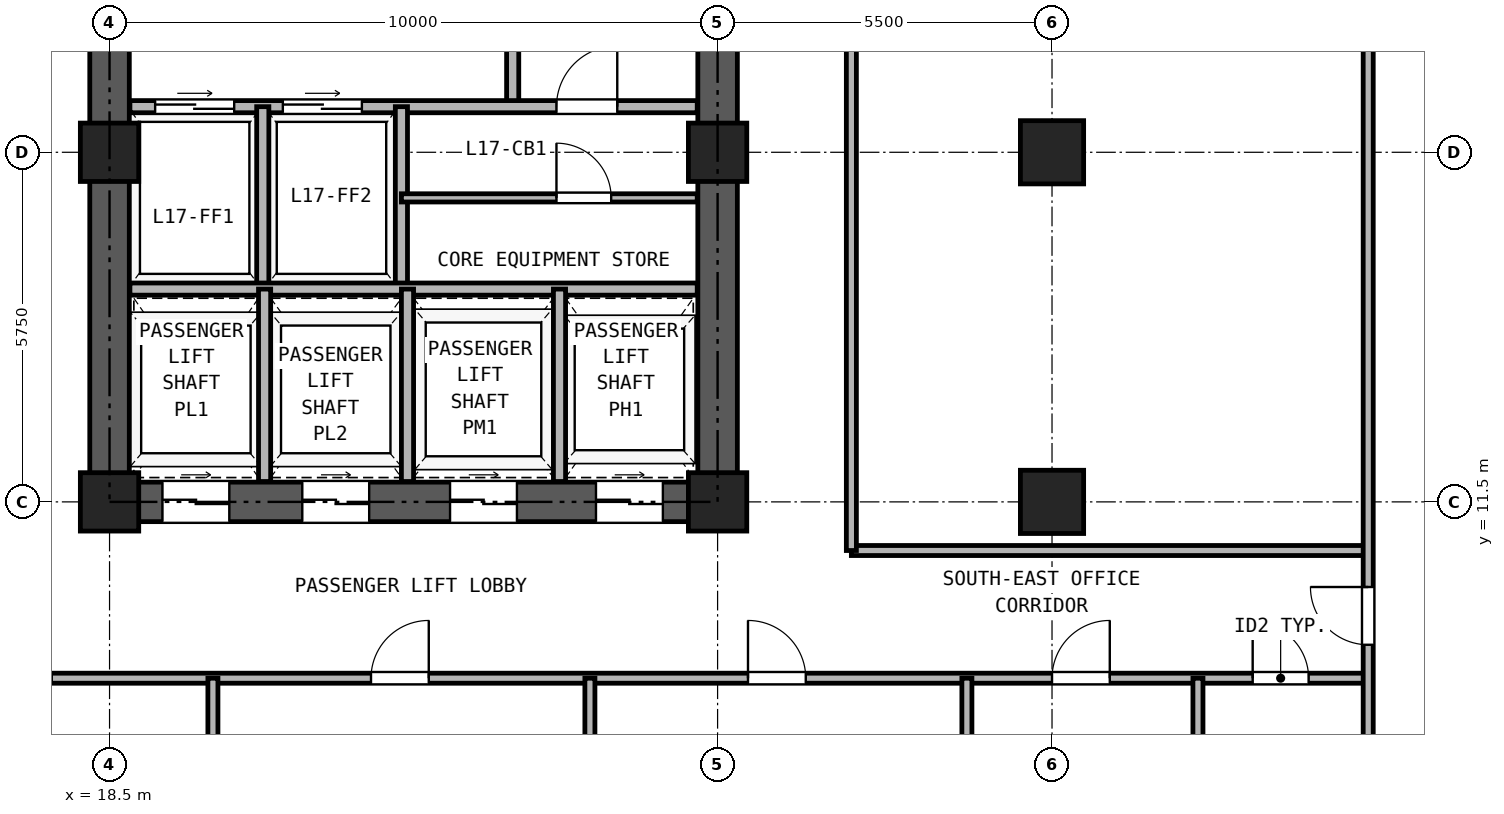
"""IFC4 building model, lengths in metres.
Left out: names, types, materials, properties, quantities, classifications, styles, units other than length and angle.
Written with IfcOpenShell. Run it as: python <this file> out.ifc"""

import sys

from ifc_helpers import new_model, si_unit, direction, frame, frame_2d, origin, origin_2d, place, context, subcontext, project, spatial, rectangle, hollow_rectangle, extrude, source, transform, mapped, element, fill, save


model = new_model("IFC4")
c1 = context("Model", 3, precision=1e-05, world=origin(), true_north=direction((0.0, 1.0)))
c2 = subcontext(c1, "Body", "Model", "MODEL_VIEW")
j1 = project(units=[si_unit("LENGTHUNIT", "METRE"), si_unit("PLANEANGLEUNIT", "RADIAN")], contexts=[c1])
p1 = place(None, origin())
s1 = spatial("IfcSite", under=j1, at=p1, CompositionType="ELEMENT")
p2 = place(p1, origin())
s2 = spatial("IfcBuilding", under=s1, at=p2, CompositionType="ELEMENT")
p3 = place(p2, frame((0.0, 0.0, 65.7)))
s3 = spatial("IfcBuildingStorey", under=s2, at=p3, CompositionType="ELEMENT", Elevation=65.7)
m1 = source(origin(), c2, "Body", "SweptSolid", [
    extrude(hollow_rectangle(XDim=0.96, YDim=0.96, WallThickness=0.06, at=origin_2d()), origin(), (0.0, 0.0, 1.0), 3.32),
])
for number, where, z_axis, x_axis in (
    (1, (18.5, 11.5, 0.0), (0.0, 0.0, 1.0), (1.0, 0.0, 0.0)),
    (2, (18.5, 17.25, 0.0), (0.0, 0.0, 1.0), (1.0, 0.0, 0.0)),
    (3, (28.5, 11.5, 0.0), (0.0, 0.0, 1.0), (1.0, 0.0, 0.0)),
    (4, (28.5, 17.25, 0.0), (0.0, 0.0, 1.0), (1.0, 0.0, 0.0)),
):
    element("IfcColumn", number, at=place(p3, frame(where, z_axis=z_axis, x_axis=x_axis)), inside=s3, PredefinedType="COLUMN", context=c2, shape_type="MappedRepresentation", body=[
        mapped(m1, transform((0.0, 0.0, 0.0), x_axis=(1.0, 0.0, 0.0), y_axis=(0.0, 1.0, 0.0), z_axis=(0.0, 0.0, 1.0), scale=1.0)),
    ])
m2 = source(origin(), c2, "Body", "SweptSolid", [
    extrude(hollow_rectangle(XDim=1.04, YDim=1.04, WallThickness=0.065, at=origin_2d()), origin(), (0.0, 0.0, 1.0), 3.32),
])
for number, where, z_axis, x_axis in (
    (5, (34.0, 11.5, 0.0), (0.0, 0.0, 1.0), (1.0, 0.0, 0.0)),
    (6, (34.0, 17.25, 0.0), (0.0, 0.0, 1.0), (1.0, 0.0, 0.0)),
):
    element("IfcColumn", number, at=place(p3, frame(where, z_axis=z_axis, x_axis=x_axis)), inside=s3, PredefinedType="COLUMN", context=c2, shape_type="MappedRepresentation", body=[
        mapped(m2, transform((0.0, 0.0, 0.0), x_axis=(1.0, 0.0, 0.0), y_axis=(0.0, 1.0, 0.0), z_axis=(0.0, 0.0, 1.0), scale=1.0)),
    ])
p4 = place(p3, frame((18.175, 11.5, 0.0), z_axis=(0.0, 0.0, 1.0), x_axis=(1.0, 0.0, 0.0)))
e7 = element("IfcWall", 7, at=p4, inside=s3, PredefinedType="SHEAR", context=c2, shape_type="SweptSolid", body=[
    extrude(rectangle(XDim=10.65, YDim=0.65, at=frame_2d((5.325, 0.0))), origin(), (0.0, 0.0, 1.0), 3.32),
])
p5 = place(p4, frame((1.195, 0.0, 0.0)))
e8 = element("IfcOpeningElement", 8, at=p5, cuts=e7, PredefinedType="OPENING", context=c2, shape_type="SweptSolid", body=[
    extrude(rectangle(XDim=1.1, YDim=2.25, at=frame_2d((0.55, 1.125))), frame((0.0, 0.335, 0.0), z_axis=(0.0, -1.0, 0.0), x_axis=(1.0, 0.0, 0.0)), (0.0, 0.0, 1.0), 0.67),
])
p6 = place(p4, frame((3.495, 0.0, 0.0)))
e9 = element("IfcOpeningElement", 9, at=p6, cuts=e7, PredefinedType="OPENING", context=c2, shape_type="SweptSolid", body=[
    extrude(rectangle(XDim=1.1, YDim=2.25, at=frame_2d((0.55, 1.125))), frame((0.0, 0.335, 0.0), z_axis=(0.0, -1.0, 0.0), x_axis=(1.0, 0.0, 0.0)), (0.0, 0.0, 1.0), 0.67),
])
p7 = place(p4, frame((5.925, 0.0, 0.0)))
e10 = element("IfcOpeningElement", 10, at=p7, cuts=e7, PredefinedType="OPENING", context=c2, shape_type="SweptSolid", body=[
    extrude(rectangle(XDim=1.1, YDim=2.25, at=frame_2d((0.55, 1.125))), frame((0.0, 0.335, 0.0), z_axis=(0.0, -1.0, 0.0), x_axis=(1.0, 0.0, 0.0)), (0.0, 0.0, 1.0), 0.67),
])
p8 = place(p4, frame((8.325, 0.0, 0.0)))
e11 = element("IfcOpeningElement", 11, at=p8, cuts=e7, PredefinedType="OPENING", context=c2, shape_type="SweptSolid", body=[
    extrude(rectangle(XDim=1.1, YDim=2.25, at=frame_2d((0.55, 1.125))), frame((0.0, 0.335, 0.0), z_axis=(0.0, -1.0, 0.0), x_axis=(1.0, 0.0, 0.0)), (0.0, 0.0, 1.0), 0.67),
])
p9 = place(p3, frame((18.5, 11.825, 0.0), z_axis=(0.0, 0.0, 1.0), x_axis=(0.0, 1.0, 0.0)))
e12 = element("IfcWall", 12, at=p9, inside=s3, PredefinedType="SHEAR", context=c2, shape_type="SweptSolid", body=[
    extrude(rectangle(XDim=16.6, YDim=0.65, at=frame_2d((8.3, 0.0))), origin(), (0.0, 0.0, 1.0), 3.32),
])
p10 = place(p9, frame((7.325, 0.0, 0.0)))
e13 = element("IfcOpeningElement", 13, at=p10, cuts=e12, PredefinedType="OPENING", context=c2, shape_type="SweptSolid", body=[
    extrude(rectangle(XDim=1.15, YDim=2.2, at=frame_2d((0.575, 1.1))), frame((0.0, 0.335, 0.0), z_axis=(0.0, -1.0, 0.0), x_axis=(1.0, 0.0, 0.0)), (0.0, 0.0, 1.0), 0.67),
])
p11 = place(p3, frame((28.5, 11.825, 0.0), z_axis=(0.0, 0.0, 1.0), x_axis=(0.0, 1.0, 0.0)))
e14 = element("IfcWall", 14, at=p11, inside=s3, PredefinedType="SHEAR", context=c2, shape_type="SweptSolid", body=[
    extrude(rectangle(XDim=16.6, YDim=0.65, at=frame_2d((8.3, 0.0))), origin(), (0.0, 0.0, 1.0), 3.32),
])
p12 = place(p11, frame((7.325, 0.0, 0.0)))
e15 = element("IfcOpeningElement", 15, at=p12, cuts=e14, PredefinedType="OPENING", context=c2, shape_type="SweptSolid", body=[
    extrude(rectangle(XDim=1.15, YDim=2.2, at=frame_2d((0.575, 1.1))), frame((0.0, 0.335, 0.0), z_axis=(0.0, -1.0, 0.0), x_axis=(1.0, 0.0, 0.0)), (0.0, 0.0, 1.0), 0.67),
])
p13 = place(p3, frame((25.13, 18.0, 0.0), z_axis=(0.0, 0.0, 1.0), x_axis=(0.0, 1.0, 0.0)))
e16 = element("IfcWall", 16, at=p13, inside=s3, PredefinedType="PARTITIONING", context=c2, shape_type="SweptSolid", body=[
    extrude(rectangle(XDim=3.39, YDim=0.2, at=frame_2d((1.695, 0.0))), origin(), (0.0, 0.0, 1.0), 3.32),
])
p14 = place(p13, frame((1.1, 0.0, 0.0)))
e17 = element("IfcOpeningElement", 17, at=p14, cuts=e16, PredefinedType="OPENING", context=c2, shape_type="SweptSolid", body=[
    extrude(rectangle(XDim=1.15, YDim=2.2, at=frame_2d((0.575, 1.1))), frame((0.0, 0.11, 0.0), z_axis=(0.0, -1.0, 0.0), x_axis=(1.0, 0.0, 0.0)), (0.0, 0.0, 1.0), 0.22),
])
p15 = place(p3, frame((18.835, 18.0, 0.0), z_axis=(0.0, 0.0, 1.0), x_axis=(1.0, 0.0, 0.0)))
e18 = element("IfcWall", 18, at=p15, inside=s3, PredefinedType="PARTITIONING", context=c2, shape_type="SweptSolid", body=[
    extrude(rectangle(XDim=9.33, YDim=0.2, at=frame_2d((4.665, 0.0))), origin(), (0.0, 0.0, 1.0), 3.32),
])
p16 = place(p15, frame((0.415, 0.0, 0.0)))
e19 = element("IfcOpeningElement", 19, at=p16, cuts=e18, PredefinedType="OPENING", context=c2, shape_type="SweptSolid", body=[
    extrude(rectangle(XDim=1.3, YDim=2.3, at=frame_2d((0.65, 1.15))), frame((0.0, 0.11, 0.0), z_axis=(0.0, -1.0, 0.0), x_axis=(1.0, 0.0, 0.0)), (0.0, 0.0, 1.0), 0.22),
])
p17 = place(p15, frame((2.515, 0.0, 0.0)))
e20 = element("IfcOpeningElement", 20, at=p17, cuts=e18, PredefinedType="OPENING", context=c2, shape_type="SweptSolid", body=[
    extrude(rectangle(XDim=1.3, YDim=2.3, at=frame_2d((0.65, 1.15))), frame((0.0, 0.11, 0.0), z_axis=(0.0, -1.0, 0.0), x_axis=(1.0, 0.0, 0.0)), (0.0, 0.0, 1.0), 0.22),
])
p18 = place(p15, frame((7.015, 0.0, 0.0)))
e21 = element("IfcOpeningElement", 21, at=p18, cuts=e18, PredefinedType="OPENING", context=c2, shape_type="SweptSolid", body=[
    extrude(rectangle(XDim=1.0, YDim=2.15, at=frame_2d((0.5, 1.075))), frame((0.0, 0.11, 0.0), z_axis=(0.0, -1.0, 0.0), x_axis=(1.0, 0.0, 0.0)), (0.0, 0.0, 1.0), 0.22),
])
for number, where, z_axis, x_axis in (
    (22, (21.02, 15.0, 0.0), (0.0, 0.0, 1.0), (0.0, 1.0, 0.0)),
    (23, (23.3, 15.0, 0.0), (0.0, 0.0, 1.0), (0.0, 1.0, 0.0)),
):
    element("IfcWall", number, at=place(p3, frame(where, z_axis=z_axis, x_axis=x_axis)), inside=s3, PredefinedType="PARTITIONING", context=c2, shape_type="SweptSolid", body=[
        extrude(rectangle(XDim=3.0, YDim=0.2, at=frame_2d((1.5, 0.0))), origin(), (0.0, 0.0, 1.0), 3.32),
    ])
p19 = place(p3, frame((18.835, 15.0, 0.0), z_axis=(0.0, 0.0, 1.0), x_axis=(1.0, 0.0, 0.0)))
e24 = element("IfcWall", 24, at=p19, inside=s3, PredefinedType="PARTITIONING", context=c2, shape_type="SweptSolid", body=[
    extrude(rectangle(XDim=9.33, YDim=0.2, at=frame_2d((4.665, 0.0))), origin(), (0.0, 0.0, 1.0), 3.32),
])
p20 = place(p3, frame((23.3, 16.5, 0.0), z_axis=(0.0, 0.0, 1.0), x_axis=(1.0, 0.0, 0.0)))
e25 = element("IfcWall", 25, at=p20, inside=s3, PredefinedType="PARTITIONING", context=c2, shape_type="SweptSolid", body=[
    extrude(rectangle(XDim=4.865, YDim=0.135, at=frame_2d((2.433, 0.0))), origin(), (0.0, 0.0, 1.0), 3.32),
])
p21 = place(p20, frame((2.55, 0.0, 0.0)))
e26 = element("IfcOpeningElement", 26, at=p21, cuts=e25, PredefinedType="OPENING", context=c2, shape_type="SweptSolid", body=[
    extrude(rectangle(XDim=0.9, YDim=2.05, at=frame_2d((0.45, 1.025))), frame((0.0, 0.077, 0.0), z_axis=(0.0, -1.0, 0.0), x_axis=(1.0, 0.0, 0.0)), (0.0, 0.0, 1.0), 0.155),
])
for number, where, z_axis, x_axis in (
    (27, (21.05, 11.835, 0.0), (0.0, 0.0, 1.0), (0.0, 1.0, 0.0)),
    (28, (23.4, 11.835, 0.0), (0.0, 0.0, 1.0), (0.0, 1.0, 0.0)),
    (29, (25.9, 11.835, 0.0), (0.0, 0.0, 1.0), (0.0, 1.0, 0.0)),
):
    element("IfcWall", number, at=place(p3, frame(where, z_axis=z_axis, x_axis=x_axis)), inside=s3, PredefinedType="PARTITIONING", context=c2, shape_type="SweptSolid", body=[
        extrude(rectangle(XDim=3.165, YDim=0.2, at=frame_2d((1.583, 0.0))), origin(), (0.0, 0.0, 1.0), 3.32),
    ])
p22 = place(p3, frame((7.8, 8.6, 0.0), z_axis=(0.0, 0.0, 1.0), x_axis=(1.0, 0.0, 0.0)))
e30 = element("IfcWall", 30, at=p22, inside=s3, PredefinedType="PARTITIONING", context=c2, shape_type="SweptSolid", body=[
    extrude(rectangle(XDim=31.4, YDim=0.165, at=frame_2d((15.7, 0.0))), origin(), (0.0, 0.0, 1.0), 2.898),
])
p23 = place(p22, frame((2.6, 0.0, 0.0)))
e31 = element("IfcOpeningElement", 31, at=p23, cuts=e30, PredefinedType="OPENING", context=c2, shape_type="SweptSolid", body=[
    extrude(rectangle(XDim=0.95, YDim=2.15, at=frame_2d((0.475, 1.075))), frame((0.0, 0.093, 0.0), z_axis=(0.0, -1.0, 0.0), x_axis=(1.0, 0.0, 0.0)), (0.0, 0.0, 1.0), 0.185),
])
p24 = place(p22, frame((8.8, 0.0, 0.0)))
e32 = element("IfcOpeningElement", 32, at=p24, cuts=e30, PredefinedType="OPENING", context=c2, shape_type="SweptSolid", body=[
    extrude(rectangle(XDim=0.95, YDim=2.15, at=frame_2d((0.475, 1.075))), frame((0.0, 0.093, 0.0), z_axis=(0.0, -1.0, 0.0), x_axis=(1.0, 0.0, 0.0)), (0.0, 0.0, 1.0), 0.185),
])
p25 = place(p22, frame((15.0, 0.0, 0.0)))
e33 = element("IfcOpeningElement", 33, at=p25, cuts=e30, PredefinedType="OPENING", context=c2, shape_type="SweptSolid", body=[
    extrude(rectangle(XDim=0.95, YDim=2.15, at=frame_2d((0.475, 1.075))), frame((0.0, 0.093, 0.0), z_axis=(0.0, -1.0, 0.0), x_axis=(1.0, 0.0, 0.0)), (0.0, 0.0, 1.0), 0.185),
])
p26 = place(p22, frame((21.2, 0.0, 0.0)))
e34 = element("IfcOpeningElement", 34, at=p26, cuts=e30, PredefinedType="OPENING", context=c2, shape_type="SweptSolid", body=[
    extrude(rectangle(XDim=0.95, YDim=2.15, at=frame_2d((0.475, 1.075))), frame((0.0, 0.093, 0.0), z_axis=(0.0, -1.0, 0.0), x_axis=(1.0, 0.0, 0.0)), (0.0, 0.0, 1.0), 0.185),
])
p27 = place(p22, frame((26.2, 0.0, 0.0)))
e35 = element("IfcOpeningElement", 35, at=p27, cuts=e30, PredefinedType="OPENING", context=c2, shape_type="SweptSolid", body=[
    extrude(rectangle(XDim=0.95, YDim=2.15, at=frame_2d((0.475, 1.075))), frame((0.0, 0.093, 0.0), z_axis=(0.0, -1.0, 0.0), x_axis=(1.0, 0.0, 0.0)), (0.0, 0.0, 1.0), 0.185),
])
p28 = place(p22, frame((29.5, 0.0, 0.0)))
e36 = element("IfcOpeningElement", 36, at=p28, cuts=e30, PredefinedType="OPENING", context=c2, shape_type="SweptSolid", body=[
    extrude(rectangle(XDim=0.92, YDim=2.1, at=frame_2d((0.46, 1.05))), frame((0.0, 0.093, 0.0), z_axis=(0.0, -1.0, 0.0), x_axis=(1.0, 0.0, 0.0)), (0.0, 0.0, 1.0), 0.185),
])
p29 = place(p3, frame((30.7, 10.7, 0.0), z_axis=(0.0, 0.0, 1.0), x_axis=(1.0, 0.0, 0.0)))
e37 = element("IfcWall", 37, at=p29, inside=s3, PredefinedType="PARTITIONING", context=c2, shape_type="SweptSolid", body=[
    extrude(rectangle(XDim=8.5, YDim=0.165, at=frame_2d((4.25, 0.0))), origin(), (0.0, 0.0, 1.0), 3.32),
])
p30 = place(p3, frame((30.7, 10.7, 0.0), z_axis=(0.0, 0.0, 1.0), x_axis=(0.0, 1.0, 0.0)))
e38 = element("IfcWall", 38, at=p30, inside=s3, PredefinedType="PARTITIONING", context=c2, shape_type="SweptSolid", body=[
    extrude(rectangle(XDim=18.9, YDim=0.165, at=frame_2d((9.45, 0.0))), origin(), (0.0, 0.0, 1.0), 3.32),
])
p31 = place(p30, frame((8.95, 0.0, 0.0)))
e39 = element("IfcOpeningElement", 39, at=p31, cuts=e38, PredefinedType="OPENING", context=c2, shape_type="SweptSolid", body=[
    extrude(rectangle(XDim=0.95, YDim=2.15, at=frame_2d((0.475, 1.075))), frame((0.0, 0.093, 0.0), z_axis=(0.0, -1.0, 0.0), x_axis=(1.0, 0.0, 0.0)), (0.0, 0.0, 1.0), 0.185),
])
p32 = place(p3, frame((39.2, 0.16, 0.0), z_axis=(0.0, 0.0, 1.0), x_axis=(0.0, 1.0, 0.0)))
e40 = element("IfcWall", 40, at=p32, inside=s3, PredefinedType="PARTITIONING", context=c2, shape_type="SweptSolid", body=[
    extrude(rectangle(XDim=40.18, YDim=0.165, at=frame_2d((20.09, 0.0))), origin(), (0.0, 0.0, 1.0), 3.32),
])
p33 = place(p32, frame((8.99, 0.0, 0.0)))
e41 = element("IfcOpeningElement", 41, at=p33, cuts=e40, PredefinedType="OPENING", context=c2, shape_type="SweptSolid", body=[
    extrude(rectangle(XDim=0.95, YDim=2.15, at=frame_2d((0.475, 1.075))), frame((0.0, 0.093, 0.0), z_axis=(0.0, -1.0, 0.0), x_axis=(1.0, 0.0, 0.0)), (0.0, 0.0, 1.0), 0.185),
])
p34 = place(p32, frame((29.99, 0.0, 0.0)))
e42 = element("IfcOpeningElement", 42, at=p34, cuts=e40, PredefinedType="OPENING", context=c2, shape_type="SweptSolid", body=[
    extrude(rectangle(XDim=0.95, YDim=2.15, at=frame_2d((0.475, 1.075))), frame((0.0, 0.093, 0.0), z_axis=(0.0, -1.0, 0.0), x_axis=(1.0, 0.0, 0.0)), (0.0, 0.0, 1.0), 0.185),
])
for number, where, z_axis, x_axis in (
    (43, (20.2, 0.16, 0.0), (0.0, 0.0, 1.0), (0.0, 1.0, 0.0)),
    (44, (26.4, 0.16, 0.0), (0.0, 0.0, 1.0), (0.0, 1.0, 0.0)),
    (45, (32.6, 0.16, 0.0), (0.0, 0.0, 1.0), (0.0, 1.0, 0.0)),
    (46, (36.4, 0.16, 0.0), (0.0, 0.0, 1.0), (0.0, 1.0, 0.0)),
):
    element("IfcWall", number, at=place(p3, frame(where, z_axis=z_axis, x_axis=x_axis)), inside=s3, PredefinedType="PARTITIONING", context=c2, shape_type="SweptSolid", body=[
        extrude(rectangle(XDim=8.44, YDim=0.165, at=frame_2d((4.22, 0.0))), origin(), (0.0, 0.0, 1.0), 3.32),
    ])
p35 = place(p16, origin())
e47 = element("IfcDoor", 47, at=p35, inside=s3, OperationType="DOUBLE_DOOR_SLIDING", PredefinedType="DOOR", context=c2, shape_type="SweptSolid", body=[
    extrude(rectangle(XDim=1.3, YDim=2.3, at=frame_2d((0.65, 1.15))), frame((0.0, 0.025, 0.0), z_axis=(0.0, -1.0, 0.0), x_axis=(1.0, 0.0, 0.0)), (0.0, 0.0, 1.0), 0.05),
])
fill(e19, e47)
p36 = place(p17, origin())
e48 = element("IfcDoor", 48, at=p36, inside=s3, OperationType="DOUBLE_DOOR_SLIDING", PredefinedType="DOOR", context=c2, shape_type="SweptSolid", body=[
    extrude(rectangle(XDim=1.3, YDim=2.3, at=frame_2d((0.65, 1.15))), frame((0.0, 0.025, 0.0), z_axis=(0.0, -1.0, 0.0), x_axis=(1.0, 0.0, 0.0)), (0.0, 0.0, 1.0), 0.05),
])
fill(e20, e48)
p37 = place(p18, frame((1.0, 0.0, 0.0), z_axis=(0.0, 0.0, 1.0), x_axis=(-1.0, 0.0, 0.0)))
e49 = element("IfcDoor", 49, at=p37, inside=s3, OperationType="SINGLE_SWING_RIGHT", PredefinedType="DOOR", context=c2, shape_type="SweptSolid", body=[
    extrude(rectangle(XDim=1.0, YDim=2.15, at=frame_2d((0.5, 1.075))), frame((0.0, 0.025, 0.0), z_axis=(0.0, -1.0, 0.0), x_axis=(1.0, 0.0, 0.0)), (0.0, 0.0, 1.0), 0.05),
])
fill(e21, e49)
p38 = place(p21, frame((0.9, 0.0, 0.0), z_axis=(0.0, 0.0, 1.0), x_axis=(-1.0, 0.0, 0.0)))
e50 = element("IfcDoor", 50, at=p38, inside=s3, OperationType="SINGLE_SWING_LEFT", PredefinedType="DOOR", context=c2, shape_type="SweptSolid", body=[
    extrude(rectangle(XDim=0.9, YDim=2.05, at=frame_2d((0.45, 1.025))), frame((0.0, 0.025, 0.0), z_axis=(0.0, -1.0, 0.0), x_axis=(1.0, 0.0, 0.0)), (0.0, 0.0, 1.0), 0.05),
])
fill(e26, e50)
p39 = place(p5, frame((1.1, 0.0, 0.0), z_axis=(0.0, 0.0, 1.0), x_axis=(-1.0, 0.0, 0.0)))
e51 = element("IfcDoor", 51, at=p39, inside=s3, OperationType="DOUBLE_DOOR_SLIDING", PredefinedType="DOOR", context=c2, shape_type="SweptSolid", body=[
    extrude(rectangle(XDim=1.1, YDim=2.25, at=frame_2d((0.55, 1.125))), frame((0.0, 0.025, 0.0), z_axis=(0.0, -1.0, 0.0), x_axis=(1.0, 0.0, 0.0)), (0.0, 0.0, 1.0), 0.05),
])
fill(e8, e51)
p40 = place(p6, frame((1.1, 0.0, 0.0), z_axis=(0.0, 0.0, 1.0), x_axis=(-1.0, 0.0, 0.0)))
e52 = element("IfcDoor", 52, at=p40, inside=s3, OperationType="DOUBLE_DOOR_SLIDING", PredefinedType="DOOR", context=c2, shape_type="SweptSolid", body=[
    extrude(rectangle(XDim=1.1, YDim=2.25, at=frame_2d((0.55, 1.125))), frame((0.0, 0.025, 0.0), z_axis=(0.0, -1.0, 0.0), x_axis=(1.0, 0.0, 0.0)), (0.0, 0.0, 1.0), 0.05),
])
fill(e9, e52)
p41 = place(p7, frame((1.1, 0.0, 0.0), z_axis=(0.0, 0.0, 1.0), x_axis=(-1.0, 0.0, 0.0)))
e53 = element("IfcDoor", 53, at=p41, inside=s3, OperationType="DOUBLE_DOOR_SLIDING", PredefinedType="DOOR", context=c2, shape_type="SweptSolid", body=[
    extrude(rectangle(XDim=1.1, YDim=2.25, at=frame_2d((0.55, 1.125))), frame((0.0, 0.025, 0.0), z_axis=(0.0, -1.0, 0.0), x_axis=(1.0, 0.0, 0.0)), (0.0, 0.0, 1.0), 0.05),
])
fill(e10, e53)
p42 = place(p8, frame((1.1, 0.0, 0.0), z_axis=(0.0, 0.0, 1.0), x_axis=(-1.0, 0.0, 0.0)))
e54 = element("IfcDoor", 54, at=p42, inside=s3, OperationType="DOUBLE_DOOR_SLIDING", PredefinedType="DOOR", context=c2, shape_type="SweptSolid", body=[
    extrude(rectangle(XDim=1.1, YDim=2.25, at=frame_2d((0.55, 1.125))), frame((0.0, 0.025, 0.0), z_axis=(0.0, -1.0, 0.0), x_axis=(1.0, 0.0, 0.0)), (0.0, 0.0, 1.0), 0.05),
])
fill(e11, e54)
p43 = place(p25, frame((0.95, 0.0, 0.0), z_axis=(0.0, 0.0, 1.0), x_axis=(-1.0, 0.0, 0.0)))
e55 = element("IfcDoor", 55, at=p43, inside=s3, OperationType="SINGLE_SWING_RIGHT", PredefinedType="DOOR", context=c2, shape_type="SweptSolid", body=[
    extrude(rectangle(XDim=0.95, YDim=2.15, at=frame_2d((0.475, 1.075))), frame((0.0, 0.025, 0.0), z_axis=(0.0, -1.0, 0.0), x_axis=(1.0, 0.0, 0.0)), (0.0, 0.0, 1.0), 0.05),
])
fill(e33, e55)
p44 = place(p26, frame((0.95, 0.0, 0.0), z_axis=(0.0, 0.0, 1.0), x_axis=(-1.0, 0.0, 0.0)))
e56 = element("IfcDoor", 56, at=p44, inside=s3, OperationType="SINGLE_SWING_LEFT", PredefinedType="DOOR", context=c2, shape_type="SweptSolid", body=[
    extrude(rectangle(XDim=0.95, YDim=2.15, at=frame_2d((0.475, 1.075))), frame((0.0, 0.025, 0.0), z_axis=(0.0, -1.0, 0.0), x_axis=(1.0, 0.0, 0.0)), (0.0, 0.0, 1.0), 0.05),
])
fill(e34, e56)
p45 = place(p27, frame((0.95, 0.0, 0.0), z_axis=(0.0, 0.0, 1.0), x_axis=(-1.0, 0.0, 0.0)))
e57 = element("IfcDoor", 57, at=p45, inside=s3, OperationType="SINGLE_SWING_RIGHT", PredefinedType="DOOR", context=c2, shape_type="SweptSolid", body=[
    extrude(rectangle(XDim=0.95, YDim=2.15, at=frame_2d((0.475, 1.075))), frame((0.0, 0.025, 0.0), z_axis=(0.0, -1.0, 0.0), x_axis=(1.0, 0.0, 0.0)), (0.0, 0.0, 1.0), 0.05),
])
fill(e35, e57)
p46 = place(p28, frame((0.92, 0.0, 0.0), z_axis=(0.0, 0.0, 1.0), x_axis=(-1.0, 0.0, 0.0)))
e58 = element("IfcDoor", 58, at=p46, inside=s3, OperationType="SINGLE_SWING_LEFT", PredefinedType="DOOR", context=c2, shape_type="SweptSolid", body=[
    extrude(rectangle(XDim=0.92, YDim=2.1, at=frame_2d((0.46, 1.05))), frame((0.0, 0.025, 0.0), z_axis=(0.0, -1.0, 0.0), x_axis=(1.0, 0.0, 0.0)), (0.0, 0.0, 1.0), 0.05),
])
fill(e36, e58)
p47 = place(p33, origin())
e59 = element("IfcDoor", 59, at=p47, inside=s3, OperationType="SINGLE_SWING_RIGHT", PredefinedType="DOOR", context=c2, shape_type="SweptSolid", body=[
    extrude(rectangle(XDim=0.95, YDim=2.15, at=frame_2d((0.475, 1.075))), frame((0.0, 0.025, 0.0), z_axis=(0.0, -1.0, 0.0), x_axis=(1.0, 0.0, 0.0)), (0.0, 0.0, 1.0), 0.05),
])
fill(e41, e59)
save(model, sys.argv[1])
